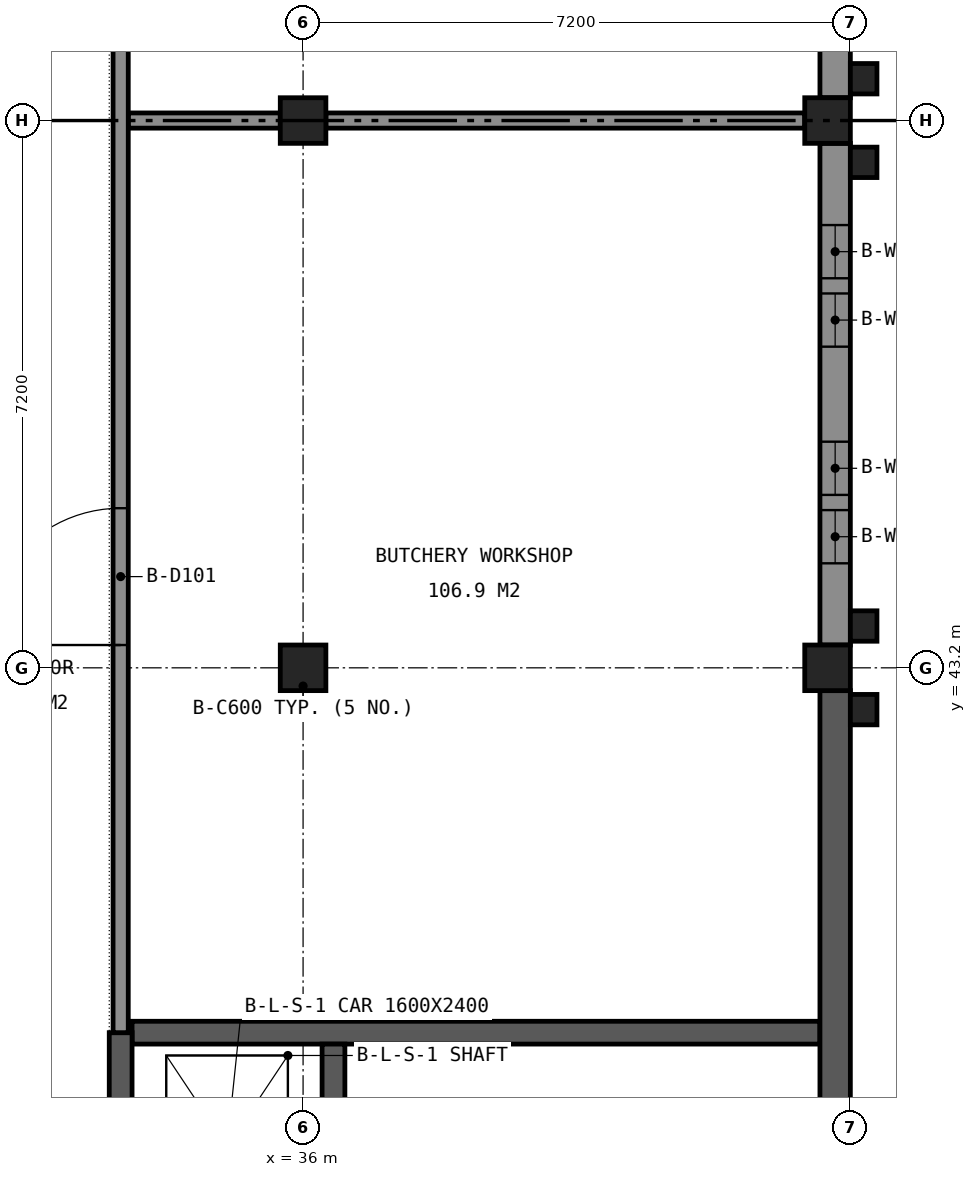
"""IFC4 building model, lengths in metres.
Left out: names, types, materials, properties, quantities, classifications, styles, units other than length and angle.
Written with IfcOpenShell. Run it as: python <this file> out.ifc"""

import sys

from ifc_helpers import new_model, si_unit, direction, frame, frame_2d, origin, origin_2d, place, context, subcontext, project, spatial, rectangle, extrude, element, fill, save


model = new_model("IFC4")
c1 = context("Model", 3, precision=1e-05, world=origin(), true_north=direction((0.0, 1.0)))
c2 = subcontext(c1, "Body", "Model", "MODEL_VIEW")
j1 = project(units=[si_unit("LENGTHUNIT", "METRE"), si_unit("PLANEANGLEUNIT", "RADIAN")], contexts=[c1])
p1 = place(None, origin())
s1 = spatial("IfcSite", under=j1, at=p1, CompositionType="ELEMENT")
p2 = place(p1, origin())
s2 = spatial("IfcBuilding", under=s1, at=p2, CompositionType="ELEMENT")
p3 = place(p2, frame((0.0, 0.0, 4.8)))
s3 = spatial("IfcBuildingStorey", under=s2, at=p3, CompositionType="ELEMENT", Elevation=4.8)
for number, where, z_axis, x_axis in (
    (1, (36.0, 43.2, 0.0), (0.0, 0.0, 1.0), (1.0, 0.0, 0.0)),
    (2, (36.0, 50.4, 0.0), (0.0, 0.0, 1.0), (1.0, 0.0, 0.0)),
    (3, (42.9, 43.2, 0.0), (0.0, 0.0, 1.0), (1.0, 0.0, 0.0)),
    (4, (42.9, 50.4, 0.0), (0.0, 0.0, 1.0), (1.0, 0.0, 0.0)),
):
    element("IfcColumn", number, at=place(p3, frame(where, z_axis=z_axis, x_axis=x_axis)), inside=s3, PredefinedType="COLUMN", context=c2, shape_type="SweptSolid", body=[
        extrude(rectangle(XDim=0.6, YDim=0.6, at=origin_2d()), origin(), (0.0, 0.0, 1.0), 4.8),
    ])
p4 = place(p3, frame((33.75, 38.4, 0.0), z_axis=(0.0, 0.0, 1.0), x_axis=(1.0, 0.0, 0.0)))
e5 = element("IfcWall", 5, at=p4, inside=s3, PredefinedType="SHEAR", context=c2, shape_type="SweptSolid", body=[
    extrude(rectangle(XDim=9.05, YDim=0.3, at=frame_2d((4.525, 0.0))), origin(), (0.0, 0.0, 1.0), 4.55),
])
p5 = place(p3, frame((33.6, 29.2, 0.0), z_axis=(0.0, 0.0, 1.0), x_axis=(0.0, 1.0, 0.0)))
e6 = element("IfcWall", 6, at=p5, inside=s3, PredefinedType="SHEAR", context=c2, shape_type="SweptSolid", body=[
    extrude(rectangle(XDim=9.2, YDim=0.3, at=frame_2d((4.6, 0.0))), origin(), (0.0, 0.0, 1.0), 4.55),
])
p6 = place(p5, frame((4.0, 0.0, 0.0)))
e7 = element("IfcOpeningElement", 7, at=p6, cuts=e6, PredefinedType="OPENING", context=c2, shape_type="SweptSolid", body=[
    extrude(rectangle(XDim=1.2, YDim=2.1, at=frame_2d((0.6, 1.05))), frame((0.0, 0.16, 0.0), z_axis=(0.0, -1.0, 0.0), x_axis=(1.0, 0.0, 0.0)), (0.0, 0.0, 1.0), 0.32),
])
p7 = place(p5, frame((0.85, 0.0, 0.0)))
e8 = element("IfcOpeningElement", 8, at=p7, cuts=e6, PredefinedType="OPENING", context=c2, shape_type="SweptSolid", body=[
    extrude(rectangle(XDim=0.9, YDim=2.1, at=frame_2d((0.45, 1.05))), frame((0.0, 0.16, 0.0), z_axis=(0.0, -1.0, 0.0), x_axis=(1.0, 0.0, 0.0)), (0.0, 0.0, 1.0), 0.32),
])
p8 = place(p3, frame((36.4, 35.55, 0.0), z_axis=(0.0, 0.0, 1.0), x_axis=(0.0, 1.0, 0.0)))
e9 = element("IfcWall", 9, at=p8, inside=s3, PredefinedType="SHEAR", context=c2, shape_type="SweptSolid", body=[
    extrude(rectangle(XDim=2.7, YDim=0.3, at=frame_2d((1.35, 0.0))), origin(), (0.0, 0.0, 1.0), 4.55),
])
p9 = place(p3, frame((43.0, 28.8, 0.0), z_axis=(0.0, 0.0, 1.0), x_axis=(0.0, 1.0, 0.0)))
e10 = element("IfcWall", 10, at=p9, inside=s3, PredefinedType="SHEAR", context=c2, shape_type="SweptSolid", body=[
    extrude(rectangle(XDim=14.1, YDim=0.4, at=frame_2d((7.05, 0.0))), origin(), (0.0, 0.0, 1.0), 4.55),
])
p10 = place(p9, frame((0.9, 0.0, 0.0)))
e11 = element("IfcOpeningElement", 11, at=p10, cuts=e10, PredefinedType="OPENING", context=c2, shape_type="SweptSolid", body=[
    extrude(rectangle(XDim=1.2, YDim=2.1, at=frame_2d((0.6, 1.05))), frame((0.0, 0.21, 0.0), z_axis=(0.0, -1.0, 0.0), x_axis=(1.0, 0.0, 0.0)), (0.0, 0.0, 1.0), 0.42),
])
p11 = place(p3, frame((43.0, 43.5, 0.0), z_axis=(0.0, 0.0, 1.0), x_axis=(0.0, 1.0, 0.0)))
e12 = element("IfcWall", 12, at=p11, inside=s3, PredefinedType="SOLIDWALL", context=c2, shape_type="SweptSolid", body=[
    extrude(rectangle(XDim=6.6, YDim=0.4, at=frame_2d((3.3, 0.0))), origin(), (0.0, 0.0, 1.0), 3.95),
])
p12 = place(p11, frame((1.075, 0.0, 0.9)))
e13 = element("IfcOpeningElement", 13, at=p12, cuts=e12, PredefinedType="OPENING", context=c2, shape_type="SweptSolid", body=[
    extrude(rectangle(XDim=0.7, YDim=2.4, at=frame_2d((0.35, 1.2))), frame((0.0, 0.21, 0.0), z_axis=(0.0, -1.0, 0.0), x_axis=(1.0, 0.0, 0.0)), (0.0, 0.0, 1.0), 0.42),
])
p13 = place(p11, frame((1.975, 0.0, 0.9)))
e14 = element("IfcOpeningElement", 14, at=p13, cuts=e12, PredefinedType="OPENING", context=c2, shape_type="SweptSolid", body=[
    extrude(rectangle(XDim=0.7, YDim=2.4, at=frame_2d((0.35, 1.2))), frame((0.0, 0.21, 0.0), z_axis=(0.0, -1.0, 0.0), x_axis=(1.0, 0.0, 0.0)), (0.0, 0.0, 1.0), 0.42),
])
p14 = place(p11, frame((3.925, 0.0, 0.9)))
e15 = element("IfcOpeningElement", 15, at=p14, cuts=e12, PredefinedType="OPENING", context=c2, shape_type="SweptSolid", body=[
    extrude(rectangle(XDim=0.7, YDim=2.4, at=frame_2d((0.35, 1.2))), frame((0.0, 0.21, 0.0), z_axis=(0.0, -1.0, 0.0), x_axis=(1.0, 0.0, 0.0)), (0.0, 0.0, 1.0), 0.42),
])
p15 = place(p11, frame((4.825, 0.0, 0.9)))
e16 = element("IfcOpeningElement", 16, at=p15, cuts=e12, PredefinedType="OPENING", context=c2, shape_type="SweptSolid", body=[
    extrude(rectangle(XDim=0.7, YDim=2.4, at=frame_2d((0.35, 1.2))), frame((0.0, 0.21, 0.0), z_axis=(0.0, -1.0, 0.0), x_axis=(1.0, 0.0, 0.0)), (0.0, 0.0, 1.0), 0.42),
])
p16 = place(p3, frame((43.0, 50.7, 0.0), z_axis=(0.0, 0.0, 1.0), x_axis=(0.0, 1.0, 0.0)))
e17 = element("IfcWall", 17, at=p16, inside=s3, PredefinedType="SOLIDWALL", context=c2, shape_type="SweptSolid", body=[
    extrude(rectangle(XDim=6.6, YDim=0.4, at=frame_2d((3.3, 0.0))), origin(), (0.0, 0.0, 1.0), 3.95),
])
p17 = place(p16, frame((0.775, 0.0, 0.9)))
e18 = element("IfcOpeningElement", 18, at=p17, cuts=e17, PredefinedType="OPENING", context=c2, shape_type="SweptSolid", body=[
    extrude(rectangle(XDim=0.7, YDim=2.4, at=frame_2d((0.35, 1.2))), frame((0.0, 0.21, 0.0), z_axis=(0.0, -1.0, 0.0), x_axis=(1.0, 0.0, 0.0)), (0.0, 0.0, 1.0), 0.42),
])
p18 = place(p16, frame((1.675, 0.0, 0.9)))
e19 = element("IfcOpeningElement", 19, at=p18, cuts=e17, PredefinedType="OPENING", context=c2, shape_type="SweptSolid", body=[
    extrude(rectangle(XDim=0.7, YDim=2.4, at=frame_2d((0.35, 1.2))), frame((0.0, 0.21, 0.0), z_axis=(0.0, -1.0, 0.0), x_axis=(1.0, 0.0, 0.0)), (0.0, 0.0, 1.0), 0.42),
])
p19 = place(p16, frame((4.225, 0.0, 0.9)))
e20 = element("IfcOpeningElement", 20, at=p19, cuts=e17, PredefinedType="OPENING", context=c2, shape_type="SweptSolid", body=[
    extrude(rectangle(XDim=0.7, YDim=2.4, at=frame_2d((0.35, 1.2))), frame((0.0, 0.21, 0.0), z_axis=(0.0, -1.0, 0.0), x_axis=(1.0, 0.0, 0.0)), (0.0, 0.0, 1.0), 0.42),
])
p20 = place(p16, frame((5.125, 0.0, 0.9)))
e21 = element("IfcOpeningElement", 21, at=p20, cuts=e17, PredefinedType="OPENING", context=c2, shape_type="SweptSolid", body=[
    extrude(rectangle(XDim=0.7, YDim=2.4, at=frame_2d((0.35, 1.2))), frame((0.0, 0.21, 0.0), z_axis=(0.0, -1.0, 0.0), x_axis=(1.0, 0.0, 0.0)), (0.0, 0.0, 1.0), 0.42),
])
for number, where, z_axis, x_axis in (
    (22, (43.375, 42.65, 0.0), (0.0, 0.0, 1.0), (1.0, 0.0, 0.0)),
    (23, (43.375, 43.75, 0.0), (0.0, 0.0, 1.0), (1.0, 0.0, 0.0)),
    (24, (43.375, 49.85, 0.0), (0.0, 0.0, 1.0), (1.0, 0.0, 0.0)),
    (25, (43.375, 50.95, 0.0), (0.0, 0.0, 1.0), (1.0, 0.0, 0.0)),
):
    element("IfcColumn", number, at=place(p3, frame(where, z_axis=z_axis, x_axis=x_axis)), inside=s3, PredefinedType="COLUMN", context=c2, shape_type="SweptSolid", body=[
        extrude(rectangle(XDim=0.35, YDim=0.4, at=origin_2d()), origin(), (0.0, 0.0, 1.0), 4.8),
    ])
p21 = place(p3, frame((33.7, 50.4, 0.0), z_axis=(0.0, 0.0, 1.0), x_axis=(1.0, 0.0, 0.0)))
e26 = element("IfcWall", 26, at=p21, inside=s3, PredefinedType="PARTITIONING", context=c2, shape_type="SweptSolid", body=[
    extrude(rectangle(XDim=2.0, YDim=0.2, at=frame_2d((1.0, 0.0))), origin(), (0.0, 0.0, 1.0), 3.95),
])
p22 = place(p3, frame((36.3, 50.4, 0.0), z_axis=(0.0, 0.0, 1.0), x_axis=(1.0, 0.0, 0.0)))
e27 = element("IfcWall", 27, at=p22, inside=s3, PredefinedType="PARTITIONING", context=c2, shape_type="SweptSolid", body=[
    extrude(rectangle(XDim=6.3, YDim=0.2, at=frame_2d((3.15, 0.0))), origin(), (0.0, 0.0, 1.0), 3.95),
])
p23 = place(p3, frame((33.6, 38.4, 0.0), z_axis=(0.0, 0.0, 1.0), x_axis=(0.0, 1.0, 0.0)))
e28 = element("IfcWall", 28, at=p23, inside=s3, PredefinedType="PARTITIONING", context=c2, shape_type="SweptSolid", body=[
    extrude(rectangle(XDim=24.0, YDim=0.2, at=frame_2d((12.0, 0.0))), origin(), (0.0, 0.0, 1.0), 3.95),
])
p24 = place(p23, frame((5.1, 0.0, 0.0)))
e29 = element("IfcOpeningElement", 29, at=p24, cuts=e28, PredefinedType="OPENING", context=c2, shape_type="SweptSolid", body=[
    extrude(rectangle(XDim=1.8, YDim=2.1, at=frame_2d((0.9, 1.05))), frame((0.0, 0.11, 0.0), z_axis=(0.0, -1.0, 0.0), x_axis=(1.0, 0.0, 0.0)), (0.0, 0.0, 1.0), 0.22),
])
p25 = place(p23, frame((13.3, 0.0, 0.0)))
e30 = element("IfcOpeningElement", 30, at=p25, cuts=e28, PredefinedType="OPENING", context=c2, shape_type="SweptSolid", body=[
    extrude(rectangle(XDim=1.0, YDim=2.1, at=frame_2d((0.5, 1.05))), frame((0.0, 0.11, 0.0), z_axis=(0.0, -1.0, 0.0), x_axis=(1.0, 0.0, 0.0)), (0.0, 0.0, 1.0), 0.22),
])
p26 = place(p23, frame((18.9, 0.0, 0.0)))
e31 = element("IfcOpeningElement", 31, at=p26, cuts=e28, PredefinedType="OPENING", context=c2, shape_type="SweptSolid", body=[
    extrude(rectangle(XDim=1.8, YDim=2.1, at=frame_2d((0.9, 1.05))), frame((0.0, 0.11, 0.0), z_axis=(0.0, -1.0, 0.0), x_axis=(1.0, 0.0, 0.0)), (0.0, 0.0, 1.0), 0.22),
])
p27 = place(p12, origin())
e32 = element("IfcWindow", 32, at=p27, inside=s3, PartitioningType="SINGLE_PANEL", PredefinedType="WINDOW", context=c2, shape_type="SweptSolid", body=[
    extrude(rectangle(XDim=0.7, YDim=2.4, at=frame_2d((0.35, 1.2))), frame((0.0, 0.03, 0.0), z_axis=(0.0, -1.0, 0.0), x_axis=(1.0, 0.0, 0.0)), (0.0, 0.0, 1.0), 0.06),
])
fill(e13, e32)
p28 = place(p13, origin())
e33 = element("IfcWindow", 33, at=p28, inside=s3, PartitioningType="SINGLE_PANEL", PredefinedType="WINDOW", context=c2, shape_type="SweptSolid", body=[
    extrude(rectangle(XDim=0.7, YDim=2.4, at=frame_2d((0.35, 1.2))), frame((0.0, 0.03, 0.0), z_axis=(0.0, -1.0, 0.0), x_axis=(1.0, 0.0, 0.0)), (0.0, 0.0, 1.0), 0.06),
])
fill(e14, e33)
p29 = place(p14, origin())
e34 = element("IfcWindow", 34, at=p29, inside=s3, PartitioningType="SINGLE_PANEL", PredefinedType="WINDOW", context=c2, shape_type="SweptSolid", body=[
    extrude(rectangle(XDim=0.7, YDim=2.4, at=frame_2d((0.35, 1.2))), frame((0.0, 0.03, 0.0), z_axis=(0.0, -1.0, 0.0), x_axis=(1.0, 0.0, 0.0)), (0.0, 0.0, 1.0), 0.06),
])
fill(e15, e34)
p30 = place(p15, origin())
e35 = element("IfcWindow", 35, at=p30, inside=s3, PartitioningType="SINGLE_PANEL", PredefinedType="WINDOW", context=c2, shape_type="SweptSolid", body=[
    extrude(rectangle(XDim=0.7, YDim=2.4, at=frame_2d((0.35, 1.2))), frame((0.0, 0.03, 0.0), z_axis=(0.0, -1.0, 0.0), x_axis=(1.0, 0.0, 0.0)), (0.0, 0.0, 1.0), 0.06),
])
fill(e16, e35)
p31 = place(p24, origin())
e36 = element("IfcDoor", 36, at=p31, inside=s3, OperationType="DOUBLE_DOOR_DOUBLE_SWING", PredefinedType="DOOR", context=c2, shape_type="SweptSolid", body=[
    extrude(rectangle(XDim=1.8, YDim=2.1, at=frame_2d((0.9, 1.05))), frame((0.0, 0.025, 0.0), z_axis=(0.0, -1.0, 0.0), x_axis=(1.0, 0.0, 0.0)), (0.0, 0.0, 1.0), 0.05),
])
fill(e29, e36)
save(model, sys.argv[1])
